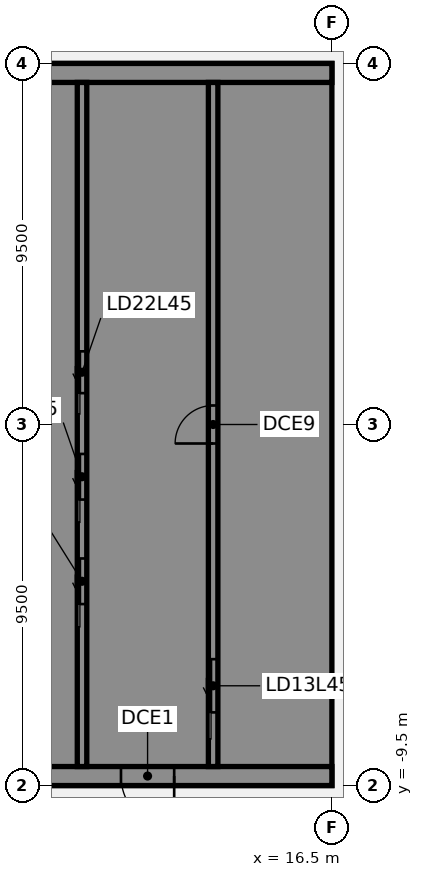
"""IFC4 building model, lengths in metres.
Left out: names, types, materials, properties, quantities, classifications, styles, units other than length and angle.
Written with IfcOpenShell. Run it as: python <this file> out.ifc"""

import sys

from ifc_helpers import new_model, si_unit, direction, frame, frame_2d, origin, place, context, subcontext, project, spatial, polyline, rectangle, outline, extrude, element, fill, save


model = new_model("IFC4")
c1 = context("Model", 3, precision=1e-05, world=origin(), true_north=direction((0.0, 1.0)))
c2 = subcontext(c1, "Body", "Model", "MODEL_VIEW")
j1 = project(units=[si_unit("LENGTHUNIT", "METRE"), si_unit("PLANEANGLEUNIT", "RADIAN")], contexts=[c1])
p1 = place(None, origin())
s1 = spatial("IfcSite", under=j1, at=p1, CompositionType="ELEMENT")
p2 = place(p1, origin())
s2 = spatial("IfcBuilding", under=s1, at=p2, CompositionType="ELEMENT")
p3 = place(p2, frame((0.0, 0.0, 182.5)))
s3 = spatial("IfcBuildingStorey", under=s2, at=p3, CompositionType="ELEMENT", Elevation=182.5)
p4 = place(p3, frame((16.5, -9.25, 0.0), z_axis=(0.0, 0.0, 1.0), x_axis=(-1.0, 0.0, 0.0)))
e1 = element("IfcWall", 1, at=p4, inside=s3, PredefinedType="SHEAR", context=c2, shape_type="SweptSolid", body=[
    extrude(rectangle(XDim=13.0, YDim=0.5, at=frame_2d((6.5, 0.0))), origin(), (0.0, 0.0, 1.0), 3.46),
])
p5 = place(p4, frame((4.15, 0.0, 0.0)))
e2 = element("IfcOpeningElement", 2, at=p5, cuts=e1, PredefinedType="OPENING", context=c2, shape_type="SweptSolid", body=[
    extrude(rectangle(XDim=1.4, YDim=2.1, at=frame_2d((0.7, 1.05))), frame((0.0, 0.26, 0.0), z_axis=(0.0, -1.0, 0.0), x_axis=(1.0, 0.0, 0.0)), (0.0, 0.0, 1.0), 0.52),
])
p6 = place(p4, frame((10.125, 0.0, 0.0)))
e3 = element("IfcOpeningElement", 3, at=p6, cuts=e1, PredefinedType="OPENING", context=c2, shape_type="SweptSolid", body=[
    extrude(rectangle(XDim=1.4, YDim=2.1, at=frame_2d((0.7, 1.05))), frame((0.0, 0.26, 0.0), z_axis=(0.0, -1.0, 0.0), x_axis=(1.0, 0.0, 0.0)), (0.0, 0.0, 1.0), 0.52),
])
p7 = place(p3, origin())
e4 = element("IfcWall", 4, at=p7, inside=s3, PredefinedType="SHEAR", context=c2, shape_type="SweptSolid", body=[
    extrude(outline(polyline([(13.5, -8.125), (13.5, -9.0), (16.0, -9.0), (16.5, -9.0), (16.5, 9.0), (16.0, 9.0), (13.5, 9.0), (13.5, 8.125), (16.0, 8.125), (16.0, 5.625), (13.5, 5.625), (13.5, 5.375), (16.0, 5.375), (16.0, -5.375), (13.5, -5.375), (13.5, -5.625), (16.0, -5.625), (16.0, -8.125), (13.5, -8.125)])), origin(), (0.0, 0.0, 1.0), 3.46),
])
p8 = place(p3, frame((16.5, 9.25, 0.0), z_axis=(0.0, 0.0, 1.0), x_axis=(-1.0, 0.0, 0.0)))
e5 = element("IfcWall", 5, at=p8, inside=s3, PredefinedType="SHEAR", context=c2, shape_type="SweptSolid", body=[
    extrude(rectangle(XDim=13.0, YDim=0.5, at=frame_2d((6.5, 0.0))), origin(), (0.0, 0.0, 1.0), 3.46),
])
p9 = place(p3, origin())
e6 = element("IfcWall", 6, at=p9, inside=s3, PredefinedType="SHEAR", context=c2, shape_type="SweptSolid", body=[
    extrude(outline(polyline([(9.8, -5.375), (7.5, -5.375), (7.5, -2.875), (9.8, -2.875), (9.8, -2.625), (7.5, -2.625), (7.5, -0.125), (9.8, -0.125), (9.8, 0.125), (7.5, 0.125), (7.5, 2.625), (9.8, 2.625), (9.8, 2.875), (7.5, 2.875), (7.5, 5.375), (9.8, 5.375), (9.8, 5.625), (7.5, 5.625), (7.5, 8.125), (9.8, 8.125), (9.8, 9.0), (7.5, 9.0), (7.25, 9.0), (7.25, -5.625), (7.5, -5.625), (9.8, -5.625), (9.8, -5.375)])), origin(), (0.0, 0.0, 1.0), 3.46),
])
p10 = place(p3, origin())
e7 = element("IfcWall", 7, at=p10, inside=s3, PredefinedType="SHEAR", context=c2, shape_type="SweptSolid", body=[
    extrude(outline(polyline([(7.5, -8.125), (7.5, -9.0), (9.8, -9.0), (9.8, -8.125), (9.8, -5.625), (9.55, -5.625), (9.55, -8.125), (7.5, -8.125)])), origin(), (0.0, 0.0, 1.0), 3.46),
])
p11 = place(p3, frame((13.375, -9.0, 0.0), z_axis=(0.0, 0.0, 1.0), x_axis=(0.0, 1.0, 0.0)))
e8 = element("IfcWall", 8, at=p11, inside=s3, PredefinedType="SHEAR", context=c2, shape_type="SweptSolid", body=[
    extrude(rectangle(XDim=18.0, YDim=0.25, at=frame_2d((9.0, 0.0))), origin(), (0.0, 0.0, 1.0), 3.46),
])
p12 = place(p11, frame((1.425, 0.0, 0.0)))
e9 = element("IfcOpeningElement", 9, at=p12, cuts=e8, PredefinedType="OPENING", context=c2, shape_type="SweptSolid", body=[
    extrude(rectangle(XDim=1.4, YDim=2.1, at=frame_2d((0.7, 1.05))), frame((0.0, 0.135, 0.0), z_axis=(0.0, -1.0, 0.0), x_axis=(1.0, 0.0, 0.0)), (0.0, 0.0, 1.0), 0.27),
])
p13 = place(p11, frame((8.5, 0.0, 0.0)))
e10 = element("IfcOpeningElement", 10, at=p13, cuts=e8, PredefinedType="OPENING", context=c2, shape_type="SweptSolid", body=[
    extrude(rectangle(XDim=1.0, YDim=2.1, at=frame_2d((0.5, 1.05))), frame((0.0, 0.135, 0.0), z_axis=(0.0, -1.0, 0.0), x_axis=(1.0, 0.0, 0.0)), (0.0, 0.0, 1.0), 0.27),
])
p14 = place(p3, frame((9.925, -9.0, 0.0), z_axis=(0.0, 0.0, 1.0), x_axis=(0.0, 1.0, 0.0)))
e11 = element("IfcWall", 11, at=p14, inside=s3, PredefinedType="SHEAR", context=c2, shape_type="SweptSolid", body=[
    extrude(rectangle(XDim=18.0, YDim=0.25, at=frame_2d((9.0, 0.0))), origin(), (0.0, 0.0, 1.0), 3.46),
])
p15 = place(p14, frame((4.275, 0.0, 0.0)))
e12 = element("IfcOpeningElement", 12, at=p15, cuts=e11, PredefinedType="OPENING", context=c2, shape_type="SweptSolid", body=[
    extrude(rectangle(XDim=1.2, YDim=2.1, at=frame_2d((0.6, 1.05))), frame((0.0, 0.135, 0.0), z_axis=(0.0, -1.0, 0.0), x_axis=(1.0, 0.0, 0.0)), (0.0, 0.0, 1.0), 0.27),
])
p16 = place(p14, frame((7.025, 0.0, 0.0)))
e13 = element("IfcOpeningElement", 13, at=p16, cuts=e11, PredefinedType="OPENING", context=c2, shape_type="SweptSolid", body=[
    extrude(rectangle(XDim=1.2, YDim=2.1, at=frame_2d((0.6, 1.05))), frame((0.0, 0.135, 0.0), z_axis=(0.0, -1.0, 0.0), x_axis=(1.0, 0.0, 0.0)), (0.0, 0.0, 1.0), 0.27),
])
p17 = place(p14, frame((9.825, 0.0, 0.0)))
e14 = element("IfcOpeningElement", 14, at=p17, cuts=e11, PredefinedType="OPENING", context=c2, shape_type="SweptSolid", body=[
    extrude(rectangle(XDim=1.1, YDim=2.1, at=frame_2d((0.55, 1.05))), frame((0.0, 0.135, 0.0), z_axis=(0.0, -1.0, 0.0), x_axis=(1.0, 0.0, 0.0)), (0.0, 0.0, 1.0), 0.27),
])
p18 = place(p5, origin())
e15 = element("IfcDoor", 15, at=p18, inside=s3, OperationType="SINGLE_SWING_LEFT", PredefinedType="DOOR", context=c2, shape_type="SweptSolid", body=[
    extrude(rectangle(XDim=1.4, YDim=2.1, at=frame_2d((0.7, 1.05))), frame((0.0, 0.025, 0.0), z_axis=(0.0, -1.0, 0.0), x_axis=(1.0, 0.0, 0.0)), (0.0, 0.0, 1.0), 0.05),
])
fill(e2, e15)
p19 = place(p12, origin())
e16 = element("IfcDoor", 16, at=p19, inside=s3, OperationType="SLIDING_TO_LEFT", PredefinedType="DOOR", context=c2, shape_type="SweptSolid", body=[
    extrude(rectangle(XDim=1.4, YDim=2.1, at=frame_2d((0.7, 1.05))), frame((0.0, 0.025, 0.0), z_axis=(0.0, -1.0, 0.0), x_axis=(1.0, 0.0, 0.0)), (0.0, 0.0, 1.0), 0.05),
])
fill(e9, e16)
p20 = place(p15, origin())
e17 = element("IfcDoor", 17, at=p20, inside=s3, OperationType="SLIDING_TO_LEFT", PredefinedType="DOOR", context=c2, shape_type="SweptSolid", body=[
    extrude(rectangle(XDim=1.2, YDim=2.1, at=frame_2d((0.6, 1.05))), frame((0.0, 0.025, 0.0), z_axis=(0.0, -1.0, 0.0), x_axis=(1.0, 0.0, 0.0)), (0.0, 0.0, 1.0), 0.05),
])
fill(e12, e17)
p21 = place(p16, origin())
e18 = element("IfcDoor", 18, at=p21, inside=s3, OperationType="SLIDING_TO_LEFT", PredefinedType="DOOR", context=c2, shape_type="SweptSolid", body=[
    extrude(rectangle(XDim=1.2, YDim=2.1, at=frame_2d((0.6, 1.05))), frame((0.0, 0.025, 0.0), z_axis=(0.0, -1.0, 0.0), x_axis=(1.0, 0.0, 0.0)), (0.0, 0.0, 1.0), 0.05),
])
fill(e13, e18)
p22 = place(p17, origin())
e19 = element("IfcDoor", 19, at=p22, inside=s3, OperationType="SLIDING_TO_LEFT", PredefinedType="DOOR", context=c2, shape_type="SweptSolid", body=[
    extrude(rectangle(XDim=1.1, YDim=2.1, at=frame_2d((0.55, 1.05))), frame((0.0, 0.025, 0.0), z_axis=(0.0, -1.0, 0.0), x_axis=(1.0, 0.0, 0.0)), (0.0, 0.0, 1.0), 0.05),
])
fill(e14, e19)
p23 = place(p13, origin())
e20 = element("IfcDoor", 20, at=p23, inside=s3, OperationType="SINGLE_SWING_LEFT", PredefinedType="DOOR", context=c2, shape_type="SweptSolid", body=[
    extrude(rectangle(XDim=1.0, YDim=2.1, at=frame_2d((0.5, 1.05))), frame((0.0, 0.025, 0.0), z_axis=(0.0, -1.0, 0.0), x_axis=(1.0, 0.0, 0.0)), (0.0, 0.0, 1.0), 0.05),
])
fill(e10, e20)
save(model, sys.argv[1])
